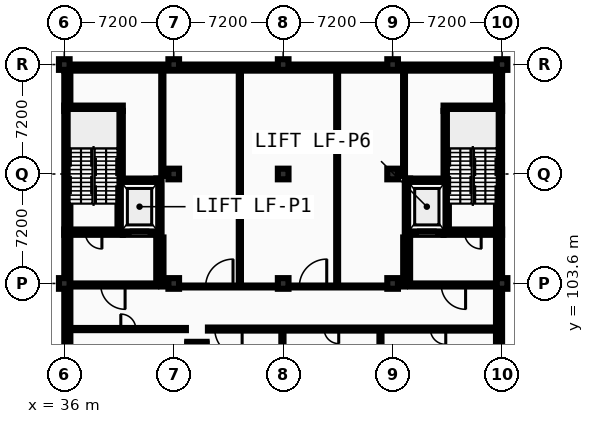
"""IFC4 building model, lengths in metres.
Left out: names, types, materials, properties, quantities, classifications, styles, units other than length and angle.
Written with IfcOpenShell. Run it as: python <this file> out.ifc"""

import sys

from ifc_helpers import new_model, si_unit, direction, frame, frame_2d, origin, origin_2d, place, context, subcontext, project, spatial, rectangle, extrude, element, fill, save


model = new_model("IFC4")
c1 = context("Model", 3, precision=1e-05, world=origin(), true_north=direction((0.0, 1.0)))
c2 = subcontext(c1, "Body", "Model", "MODEL_VIEW")
j1 = project(units=[si_unit("LENGTHUNIT", "METRE"), si_unit("PLANEANGLEUNIT", "RADIAN")], contexts=[c1])
p1 = place(None, origin())
s1 = spatial("IfcSite", under=j1, at=p1, CompositionType="ELEMENT")
p2 = place(p1, origin())
s2 = spatial("IfcBuilding", under=s1, at=p2, CompositionType="ELEMENT")
p3 = place(p2, frame((0.0, 0.0, -4.8)))
s3 = spatial("IfcBuildingStorey", under=s2, at=p3, CompositionType="ELEMENT", Elevation=-4.8)
for number, where, z_axis, x_axis in (
    (1, (36.0, 103.6, 0.0), (0.0, 0.0, 1.0), (1.0, 0.0, 0.0)),
    (2, (36.0, 118.0, 0.0), (0.0, 0.0, 1.0), (1.0, 0.0, 0.0)),
    (3, (43.2, 103.6, 0.0), (0.0, 0.0, 1.0), (1.0, 0.0, 0.0)),
    (4, (43.2, 110.8, 0.0), (0.0, 0.0, 1.0), (1.0, 0.0, 0.0)),
    (5, (43.2, 118.0, 0.0), (0.0, 0.0, 1.0), (1.0, 0.0, 0.0)),
    (6, (50.4, 103.6, 0.0), (0.0, 0.0, 1.0), (1.0, 0.0, 0.0)),
    (7, (50.4, 110.8, 0.0), (0.0, 0.0, 1.0), (1.0, 0.0, 0.0)),
    (8, (50.4, 118.0, 0.0), (0.0, 0.0, 1.0), (1.0, 0.0, 0.0)),
    (9, (57.6, 103.6, 0.0), (0.0, 0.0, 1.0), (1.0, 0.0, 0.0)),
    (10, (57.6, 110.8, 0.0), (0.0, 0.0, 1.0), (1.0, 0.0, 0.0)),
    (11, (57.6, 118.0, 0.0), (0.0, 0.0, 1.0), (1.0, 0.0, 0.0)),
    (12, (64.8, 103.6, 0.0), (0.0, 0.0, 1.0), (1.0, 0.0, 0.0)),
    (13, (64.8, 118.0, 0.0), (0.0, 0.0, 1.0), (1.0, 0.0, 0.0)),
):
    element("IfcColumn", number, at=place(p3, frame(where, z_axis=z_axis, x_axis=x_axis)), inside=s3, PredefinedType="COLUMN", context=c2, shape_type="SweptSolid", body=[
        extrude(rectangle(XDim=0.7, YDim=0.7, at=origin_2d()), origin(), (0.0, 0.0, 1.0), 4.8),
    ])
p4 = place(p3, frame((64.6, 79.2, 0.0), z_axis=(0.0, 0.0, 1.0), x_axis=(0.0, 1.0, 0.0)))
e14 = element("IfcWall", 14, at=p4, inside=s3, PredefinedType="USERDEFINED", context=c2, shape_type="SweptSolid", body=[
    extrude(rectangle(XDim=38.4, YDim=0.4, at=frame_2d((19.2, 0.0))), origin(), (0.0, 0.0, 1.0), 4.545),
])
p5 = place(p3, frame((64.8, 117.8, 0.0), z_axis=(0.0, 0.0, 1.0), x_axis=(-1.0, 0.0, 0.0)))
e15 = element("IfcWall", 15, at=p5, inside=s3, PredefinedType="USERDEFINED", context=c2, shape_type="SweptSolid", body=[
    extrude(rectangle(XDim=28.8, YDim=0.4, at=frame_2d((14.4, 0.0))), origin(), (0.0, 0.0, 1.0), 4.545),
])
p6 = place(p3, frame((36.2, 117.6, 0.0), z_axis=(0.0, 0.0, 1.0), x_axis=(0.0, -1.0, 0.0)))
e16 = element("IfcWall", 16, at=p6, inside=s3, PredefinedType="USERDEFINED", context=c2, shape_type="SweptSolid", body=[
    extrude(rectangle(XDim=38.4, YDim=0.4, at=frame_2d((19.2, 0.0))), origin(), (0.0, 0.0, 1.0), 4.545),
])
p7 = place(p3, frame((36.0, 106.975, 0.0), z_axis=(0.0, 0.0, 1.0), x_axis=(1.0, 0.0, 0.0)))
e17 = element("IfcWall", 17, at=p7, inside=s3, PredefinedType="SHEAR", context=c2, shape_type="SweptSolid", body=[
    extrude(rectangle(XDim=3.85, YDim=0.35, at=frame_2d((1.925, 0.0))), origin(), (0.0, 0.0, 1.0), 4.545),
])
p8 = place(p7, frame((1.375, 0.0, 0.0)))
e18 = element("IfcOpeningElement", 18, at=p8, cuts=e17, PredefinedType="OPENING", context=c2, shape_type="SweptSolid", body=[
    extrude(rectangle(XDim=1.1, YDim=2.15, at=frame_2d((0.55, 1.075))), frame((0.0, 0.185, 0.0), z_axis=(0.0, -1.0, 0.0), x_axis=(1.0, 0.0, 0.0)), (0.0, 0.0, 1.0), 0.37),
])
p9 = place(p3, frame((36.0, 115.125, 0.0), z_axis=(0.0, 0.0, 1.0), x_axis=(1.0, 0.0, 0.0)))
e19 = element("IfcWall", 19, at=p9, inside=s3, PredefinedType="SHEAR", context=c2, shape_type="SweptSolid", body=[
    extrude(rectangle(XDim=3.85, YDim=0.35, at=frame_2d((1.925, 0.0))), origin(), (0.0, 0.0, 1.0), 4.545),
])
p10 = place(p3, frame((39.675, 107.15, 0.0), z_axis=(0.0, 0.0, 1.0), x_axis=(0.0, 1.0, 0.0)))
e20 = element("IfcWall", 20, at=p10, inside=s3, PredefinedType="SHEAR", context=c2, shape_type="SweptSolid", body=[
    extrude(rectangle(XDim=7.8, YDim=0.35, at=frame_2d((3.9, 0.0))), origin(), (0.0, 0.0, 1.0), 4.545),
])
p11 = place(p3, frame((39.85, 106.975, 0.0), z_axis=(0.0, 0.0, 1.0), x_axis=(1.0, 0.0, 0.0)))
e21 = element("IfcWall", 21, at=p11, inside=s3, PredefinedType="SHEAR", context=c2, shape_type="SweptSolid", body=[
    extrude(rectangle(XDim=2.2, YDim=0.35, at=frame_2d((1.1, 0.0))), origin(), (0.0, 0.0, 1.0), 4.545),
])
p12 = place(p11, frame((0.5, 0.0, 0.0)))
e22 = element("IfcOpeningElement", 22, at=p12, cuts=e21, PredefinedType="OPENING", context=c2, shape_type="SweptSolid", body=[
    extrude(rectangle(XDim=1.2, YDim=2.2, at=frame_2d((0.6, 1.1))), frame((0.0, 0.185, 0.0), z_axis=(0.0, -1.0, 0.0), x_axis=(1.0, 0.0, 0.0)), (0.0, 0.0, 1.0), 0.37),
])
p13 = place(p3, frame((39.85, 110.325, 0.0), z_axis=(0.0, 0.0, 1.0), x_axis=(1.0, 0.0, 0.0)))
e23 = element("IfcWall", 23, at=p13, inside=s3, PredefinedType="SHEAR", context=c2, shape_type="SweptSolid", body=[
    extrude(rectangle(XDim=2.2, YDim=0.35, at=frame_2d((1.1, 0.0))), origin(), (0.0, 0.0, 1.0), 4.545),
])
p14 = place(p3, frame((42.225, 106.8, 0.0), z_axis=(0.0, 0.0, 1.0), x_axis=(0.0, 1.0, 0.0)))
e24 = element("IfcWall", 24, at=p14, inside=s3, PredefinedType="SHEAR", context=c2, shape_type="SweptSolid", body=[
    extrude(rectangle(XDim=3.7, YDim=0.35, at=frame_2d((1.85, 0.0))), origin(), (0.0, 0.0, 1.0), 4.545),
])
p15 = place(p3, frame((36.35, 103.5, 0.0), z_axis=(0.0, 0.0, 1.0), x_axis=(1.0, 0.0, 0.0)))
e25 = element("IfcWall", 25, at=p15, inside=s3, PredefinedType="PARTITIONING", context=c2, shape_type="SweptSolid", body=[
    extrude(rectangle(XDim=5.7, YDim=0.2, at=frame_2d((2.85, 0.0))), origin(), (0.0, 0.0, 1.0), 4.095),
])
p16 = place(p15, frame((2.05, 0.0, 0.0)))
e26 = element("IfcOpeningElement", 26, at=p16, cuts=e25, PredefinedType="OPENING", context=c2, shape_type="SweptSolid", body=[
    extrude(rectangle(XDim=1.6, YDim=2.2, at=frame_2d((0.8, 1.1))), frame((0.0, 0.11, 0.0), z_axis=(0.0, -1.0, 0.0), x_axis=(1.0, 0.0, 0.0)), (0.0, 0.0, 1.0), 0.22),
])
p17 = place(p3, frame((42.15, 103.6, 0.0), z_axis=(0.0, 0.0, 1.0), x_axis=(0.0, 1.0, 0.0)))
e27 = element("IfcWall", 27, at=p17, inside=s3, PredefinedType="PARTITIONING", context=c2, shape_type="SweptSolid", body=[
    extrude(rectangle(XDim=3.2, YDim=0.2, at=frame_2d((1.6, 0.0))), origin(), (0.0, 0.0, 1.0), 4.545),
])
p18 = place(p3, frame((60.95, 106.975, 0.0), z_axis=(0.0, 0.0, 1.0), x_axis=(1.0, 0.0, 0.0)))
e28 = element("IfcWall", 28, at=p18, inside=s3, PredefinedType="SHEAR", context=c2, shape_type="SweptSolid", body=[
    extrude(rectangle(XDim=3.85, YDim=0.35, at=frame_2d((1.925, 0.0))), origin(), (0.0, 0.0, 1.0), 4.545),
])
p19 = place(p18, frame((1.375, 0.0, 0.0)))
e29 = element("IfcOpeningElement", 29, at=p19, cuts=e28, PredefinedType="OPENING", context=c2, shape_type="SweptSolid", body=[
    extrude(rectangle(XDim=1.1, YDim=2.15, at=frame_2d((0.55, 1.075))), frame((0.0, 0.185, 0.0), z_axis=(0.0, -1.0, 0.0), x_axis=(1.0, 0.0, 0.0)), (0.0, 0.0, 1.0), 0.37),
])
p20 = place(p3, frame((60.95, 115.125, 0.0), z_axis=(0.0, 0.0, 1.0), x_axis=(1.0, 0.0, 0.0)))
e30 = element("IfcWall", 30, at=p20, inside=s3, PredefinedType="SHEAR", context=c2, shape_type="SweptSolid", body=[
    extrude(rectangle(XDim=3.85, YDim=0.35, at=frame_2d((1.925, 0.0))), origin(), (0.0, 0.0, 1.0), 4.545),
])
p21 = place(p3, frame((61.125, 107.15, 0.0), z_axis=(0.0, 0.0, 1.0), x_axis=(0.0, 1.0, 0.0)))
e31 = element("IfcWall", 31, at=p21, inside=s3, PredefinedType="SHEAR", context=c2, shape_type="SweptSolid", body=[
    extrude(rectangle(XDim=7.8, YDim=0.35, at=frame_2d((3.9, 0.0))), origin(), (0.0, 0.0, 1.0), 4.545),
])
p22 = place(p3, frame((58.75, 106.975, 0.0), z_axis=(0.0, 0.0, 1.0), x_axis=(1.0, 0.0, 0.0)))
e32 = element("IfcWall", 32, at=p22, inside=s3, PredefinedType="SHEAR", context=c2, shape_type="SweptSolid", body=[
    extrude(rectangle(XDim=2.2, YDim=0.35, at=frame_2d((1.1, 0.0))), origin(), (0.0, 0.0, 1.0), 4.545),
])
p23 = place(p22, frame((0.5, 0.0, 0.0)))
e33 = element("IfcOpeningElement", 33, at=p23, cuts=e32, PredefinedType="OPENING", context=c2, shape_type="SweptSolid", body=[
    extrude(rectangle(XDim=1.2, YDim=2.2, at=frame_2d((0.6, 1.1))), frame((0.0, 0.185, 0.0), z_axis=(0.0, -1.0, 0.0), x_axis=(1.0, 0.0, 0.0)), (0.0, 0.0, 1.0), 0.37),
])
p24 = place(p3, frame((58.75, 110.325, 0.0), z_axis=(0.0, 0.0, 1.0), x_axis=(1.0, 0.0, 0.0)))
e34 = element("IfcWall", 34, at=p24, inside=s3, PredefinedType="SHEAR", context=c2, shape_type="SweptSolid", body=[
    extrude(rectangle(XDim=2.2, YDim=0.35, at=frame_2d((1.1, 0.0))), origin(), (0.0, 0.0, 1.0), 4.545),
])
p25 = place(p3, frame((58.575, 106.8, 0.0), z_axis=(0.0, 0.0, 1.0), x_axis=(0.0, 1.0, 0.0)))
e35 = element("IfcWall", 35, at=p25, inside=s3, PredefinedType="SHEAR", context=c2, shape_type="SweptSolid", body=[
    extrude(rectangle(XDim=3.7, YDim=0.35, at=frame_2d((1.85, 0.0))), origin(), (0.0, 0.0, 1.0), 4.545),
])
p26 = place(p3, frame((58.75, 103.5, 0.0), z_axis=(0.0, 0.0, 1.0), x_axis=(1.0, 0.0, 0.0)))
e36 = element("IfcWall", 36, at=p26, inside=s3, PredefinedType="PARTITIONING", context=c2, shape_type="SweptSolid", body=[
    extrude(rectangle(XDim=5.7, YDim=0.2, at=frame_2d((2.85, 0.0))), origin(), (0.0, 0.0, 1.0), 4.095),
])
p27 = place(p26, frame((2.05, 0.0, 0.0)))
e37 = element("IfcOpeningElement", 37, at=p27, cuts=e36, PredefinedType="OPENING", context=c2, shape_type="SweptSolid", body=[
    extrude(rectangle(XDim=1.6, YDim=2.2, at=frame_2d((0.8, 1.1))), frame((0.0, 0.11, 0.0), z_axis=(0.0, -1.0, 0.0), x_axis=(1.0, 0.0, 0.0)), (0.0, 0.0, 1.0), 0.22),
])
p28 = place(p3, frame((58.65, 103.6, 0.0), z_axis=(0.0, 0.0, 1.0), x_axis=(0.0, 1.0, 0.0)))
e38 = element("IfcWall", 38, at=p28, inside=s3, PredefinedType="PARTITIONING", context=c2, shape_type="SweptSolid", body=[
    extrude(rectangle(XDim=3.2, YDim=0.2, at=frame_2d((1.6, 0.0))), origin(), (0.0, 0.0, 1.0), 4.545),
])
p29 = place(p3, frame((44.09, 99.705, 0.0), z_axis=(0.0, 0.0, 1.0), x_axis=(1.0, 0.0, 0.0)))
e39 = element("IfcWall", 39, at=p29, inside=s3, PredefinedType="PARTITIONING", context=c2, shape_type="SweptSolid", body=[
    extrude(rectangle(XDim=1.27, YDim=0.11, at=frame_2d((0.635, 0.0))), origin(), (0.0, 0.0, 1.0), 4.54),
])
for number, where, z_axis, x_axis in (
    (40, (44.145, 98.6, 0.0), (0.0, 0.0, 1.0), (0.0, 1.0, 0.0)),
    (41, (45.305, 98.6, 0.0), (0.0, 0.0, 1.0), (0.0, 1.0, 0.0)),
):
    element("IfcWall", number, at=place(p3, frame(where, z_axis=z_axis, x_axis=x_axis)), inside=s3, PredefinedType="PARTITIONING", context=c2, shape_type="SweptSolid", body=[
        extrude(rectangle(XDim=1.05, YDim=0.11, at=frame_2d((0.525, 0.0))), origin(), (0.0, 0.0, 1.0), 4.54),
    ])
p30 = place(p3, frame((36.42, 100.6, 0.0), z_axis=(0.0, 0.0, 1.0), x_axis=(1.0, 0.0, 0.0)))
e42 = element("IfcWall", 42, at=p30, inside=s3, PredefinedType="PARTITIONING", context=c2, shape_type="SweptSolid", body=[
    extrude(rectangle(XDim=7.58, YDim=0.142, at=frame_2d((3.79, 0.0))), origin(), (0.0, 0.0, 1.0), 4.545),
])
p31 = place(p30, frame((3.298, 0.0, 0.0)))
e43 = element("IfcOpeningElement", 43, at=p31, cuts=e42, PredefinedType="OPENING", context=c2, shape_type="SweptSolid", body=[
    extrude(rectangle(XDim=0.984, YDim=2.068, at=frame_2d((0.492, 1.034))), frame((0.0, 0.081, 0.0), z_axis=(0.0, -1.0, 0.0), x_axis=(1.0, 0.0, 0.0)), (0.0, 0.0, 1.0), 0.162),
])
p32 = place(p3, frame((45.45, 100.6, 0.0), z_axis=(0.0, 0.0, 1.0), x_axis=(1.0, 0.0, 0.0)))
e44 = element("IfcWall", 44, at=p32, inside=s3, PredefinedType="PARTITIONING", context=c2, shape_type="SweptSolid", body=[
    extrude(rectangle(XDim=18.93, YDim=0.2, at=frame_2d((9.465, 0.0))), origin(), (0.0, 0.0, 1.0), 4.545),
])
p33 = place(p32, frame((0.45, 0.0, 0.0)))
e45 = element("IfcOpeningElement", 45, at=p33, cuts=e44, PredefinedType="OPENING", context=c2, shape_type="SweptSolid", body=[
    extrude(rectangle(XDim=1.8, YDim=2.3, at=frame_2d((0.9, 1.15))), frame((0.0, 0.11, 0.0), z_axis=(0.0, -1.0, 0.0), x_axis=(1.0, 0.0, 0.0)), (0.0, 0.0, 1.0), 0.22),
])
p34 = place(p32, frame((7.646, 0.0, 0.0)))
e46 = element("IfcOpeningElement", 46, at=p34, cuts=e44, PredefinedType="OPENING", context=c2, shape_type="SweptSolid", body=[
    extrude(rectangle(XDim=0.958, YDim=2.068, at=frame_2d((0.479, 1.034))), frame((0.0, 0.11, 0.0), z_axis=(0.0, -1.0, 0.0), x_axis=(1.0, 0.0, 0.0)), (0.0, 0.0, 1.0), 0.22),
])
p35 = place(p32, frame((14.635, 0.0, 0.0)))
e47 = element("IfcOpeningElement", 47, at=p35, cuts=e44, PredefinedType="OPENING", context=c2, shape_type="SweptSolid", body=[
    extrude(rectangle(XDim=1.01, YDim=2.068, at=frame_2d((0.505, 1.034))), frame((0.0, 0.11, 0.0), z_axis=(0.0, -1.0, 0.0), x_axis=(1.0, 0.0, 0.0)), (0.0, 0.0, 1.0), 0.22),
])
p36 = place(p3, frame((43.58, 103.4, 0.0), z_axis=(0.0, 0.0, 1.0), x_axis=(1.0, 0.0, 0.0)))
e48 = element("IfcWall", 48, at=p36, inside=s3, PredefinedType="PARTITIONING", context=c2, shape_type="SweptSolid", body=[
    extrude(rectangle(XDim=6.44, YDim=0.125, at=frame_2d((3.22, 0.0))), origin(), (0.0, 0.0, 1.0), 4.095),
])
p37 = place(p36, frame((1.72, 0.0, 0.0)))
e49 = element("IfcOpeningElement", 49, at=p37, cuts=e48, PredefinedType="OPENING", context=c2, shape_type="SweptSolid", body=[
    extrude(rectangle(XDim=1.8, YDim=2.3, at=frame_2d((0.9, 1.15))), frame((0.0, 0.073, 0.0), z_axis=(0.0, -1.0, 0.0), x_axis=(1.0, 0.0, 0.0)), (0.0, 0.0, 1.0), 0.145),
])
p38 = place(p3, frame((50.78, 103.4, 0.0), z_axis=(0.0, 0.0, 1.0), x_axis=(1.0, 0.0, 0.0)))
e50 = element("IfcWall", 50, at=p38, inside=s3, PredefinedType="PARTITIONING", context=c2, shape_type="SweptSolid", body=[
    extrude(rectangle(XDim=6.44, YDim=0.125, at=frame_2d((3.22, 0.0))), origin(), (0.0, 0.0, 1.0), 4.095),
])
p39 = place(p38, frame((3.62, 0.0, 0.0)))
e51 = element("IfcOpeningElement", 51, at=p39, cuts=e50, PredefinedType="OPENING", context=c2, shape_type="SweptSolid", body=[
    extrude(rectangle(XDim=1.0, YDim=2.1, at=frame_2d((0.5, 1.05))), frame((0.0, 0.073, 0.0), z_axis=(0.0, -1.0, 0.0), x_axis=(1.0, 0.0, 0.0)), (0.0, 0.0, 1.0), 0.145),
])
p40 = place(p38, frame((0.685, 0.0, 0.0)))
e52 = element("IfcOpeningElement", 52, at=p40, cuts=e50, PredefinedType="OPENING", context=c2, shape_type="SweptSolid", body=[
    extrude(rectangle(XDim=1.8, YDim=2.3, at=frame_2d((0.9, 1.15))), frame((0.0, 0.073, 0.0), z_axis=(0.0, -1.0, 0.0), x_axis=(1.0, 0.0, 0.0)), (0.0, 0.0, 1.0), 0.145),
])
p41 = place(p3, frame((42.45, 103.4, 0.0), z_axis=(0.0, 0.0, 1.0), x_axis=(0.0, 1.0, 0.0)))
e53 = element("IfcWall", 53, at=p41, inside=s3, PredefinedType="PARTITIONING", context=c2, shape_type="SweptSolid", body=[
    extrude(rectangle(XDim=3.225, YDim=0.15, at=frame_2d((1.613, 0.0))), origin(), (0.0, 0.0, 1.0), 4.545),
])
p42 = place(p3, frame((42.45, 110.675, 0.0), z_axis=(0.0, 0.0, 1.0), x_axis=(0.0, 1.0, 0.0)))
e54 = element("IfcWall", 54, at=p42, inside=s3, PredefinedType="PARTITIONING", context=c2, shape_type="SweptSolid", body=[
    extrude(rectangle(XDim=6.925, YDim=0.142, at=frame_2d((3.462, 0.0))), origin(), (0.0, 0.0, 1.0), 4.545),
])
p43 = place(p3, frame((47.55, 103.462, 0.0), z_axis=(0.0, 0.0, 1.0), x_axis=(0.0, 1.0, 0.0)))
e55 = element("IfcWall", 55, at=p43, inside=s3, PredefinedType="PARTITIONING", context=c2, shape_type="SweptSolid", body=[
    extrude(rectangle(XDim=14.138, YDim=0.142, at=frame_2d((7.069, 0.0))), origin(), (0.0, 0.0, 1.0), 4.545),
])
p44 = place(p3, frame((50.35, 96.78, 0.0), z_axis=(0.0, 0.0, 1.0), x_axis=(0.0, 1.0, 0.0)))
e56 = element("IfcWall", 56, at=p44, inside=s3, PredefinedType="PARTITIONING", context=c2, shape_type="SweptSolid", body=[
    extrude(rectangle(XDim=3.72, YDim=0.142, at=frame_2d((1.86, 0.0))), origin(), (0.0, 0.0, 1.0), 4.245),
])
p45 = place(p3, frame((53.95, 103.462, 0.0), z_axis=(0.0, 0.0, 1.0), x_axis=(0.0, 1.0, 0.0)))
e57 = element("IfcWall", 57, at=p45, inside=s3, PredefinedType="PARTITIONING", context=c2, shape_type="SweptSolid", body=[
    extrude(rectangle(XDim=14.138, YDim=0.125, at=frame_2d((7.069, 0.0))), origin(), (0.0, 0.0, 1.0), 4.545),
])
p46 = place(p3, frame((56.8, 82.3, 0.0), z_axis=(0.0, 0.0, 1.0), x_axis=(0.0, 1.0, 0.0)))
e58 = element("IfcWall", 58, at=p46, inside=s3, PredefinedType="PARTITIONING", context=c2, shape_type="SweptSolid", body=[
    extrude(rectangle(XDim=18.2, YDim=0.135, at=frame_2d((9.1, 0.0))), origin(), (0.0, 0.0, 1.0), 4.545),
])
p47 = place(p3, frame((58.35, 103.4, 0.0), z_axis=(0.0, 0.0, 1.0), x_axis=(0.0, 1.0, 0.0)))
e59 = element("IfcWall", 59, at=p47, inside=s3, PredefinedType="PARTITIONING", context=c2, shape_type="SweptSolid", body=[
    extrude(rectangle(XDim=3.225, YDim=0.11, at=frame_2d((1.613, 0.0))), origin(), (0.0, 0.0, 1.0), 4.545),
])
p48 = place(p3, frame((58.35, 110.675, 0.0), z_axis=(0.0, 0.0, 1.0), x_axis=(0.0, 1.0, 0.0)))
e60 = element("IfcWall", 60, at=p48, inside=s3, PredefinedType="PARTITIONING", context=c2, shape_type="SweptSolid", body=[
    extrude(rectangle(XDim=6.925, YDim=0.125, at=frame_2d((3.462, 0.0))), origin(), (0.0, 0.0, 1.0), 4.545),
])
p49 = place(p8, origin())
e61 = element("IfcDoor", 61, at=p49, inside=s3, OperationType="SINGLE_SWING_RIGHT", PredefinedType="DOOR", context=c2, shape_type="SweptSolid", body=[
    extrude(rectangle(XDim=1.1, YDim=2.15, at=frame_2d((0.55, 1.075))), frame((0.0, 0.025, 0.0), z_axis=(0.0, -1.0, 0.0), x_axis=(1.0, 0.0, 0.0)), (0.0, 0.0, 1.0), 0.05),
])
fill(e18, e61)
p50 = place(p12, origin())
e62 = element("IfcDoor", 62, at=p50, inside=s3, OperationType="SLIDING_TO_RIGHT", PredefinedType="DOOR", context=c2, shape_type="SweptSolid", body=[
    extrude(rectangle(XDim=1.2, YDim=2.2, at=frame_2d((0.6, 1.1))), frame((0.0, 0.025, 0.0), z_axis=(0.0, -1.0, 0.0), x_axis=(1.0, 0.0, 0.0)), (0.0, 0.0, 1.0), 0.05),
])
fill(e22, e62)
p51 = place(p16, origin())
e63 = element("IfcDoor", 63, at=p51, inside=s3, OperationType="DOUBLE_DOOR_SINGLE_SWING", PredefinedType="DOOR", context=c2, shape_type="SweptSolid", body=[
    extrude(rectangle(XDim=1.6, YDim=2.2, at=frame_2d((0.8, 1.1))), frame((0.0, 0.025, 0.0), z_axis=(0.0, -1.0, 0.0), x_axis=(1.0, 0.0, 0.0)), (0.0, 0.0, 1.0), 0.05),
])
fill(e26, e63)
p52 = place(p19, origin())
e64 = element("IfcDoor", 64, at=p52, inside=s3, OperationType="SINGLE_SWING_RIGHT", PredefinedType="DOOR", context=c2, shape_type="SweptSolid", body=[
    extrude(rectangle(XDim=1.1, YDim=2.15, at=frame_2d((0.55, 1.075))), frame((0.0, 0.025, 0.0), z_axis=(0.0, -1.0, 0.0), x_axis=(1.0, 0.0, 0.0)), (0.0, 0.0, 1.0), 0.05),
])
fill(e29, e64)
p53 = place(p23, origin())
e65 = element("IfcDoor", 65, at=p53, inside=s3, OperationType="SLIDING_TO_RIGHT", PredefinedType="DOOR", context=c2, shape_type="SweptSolid", body=[
    extrude(rectangle(XDim=1.2, YDim=2.2, at=frame_2d((0.6, 1.1))), frame((0.0, 0.025, 0.0), z_axis=(0.0, -1.0, 0.0), x_axis=(1.0, 0.0, 0.0)), (0.0, 0.0, 1.0), 0.05),
])
fill(e33, e65)
p54 = place(p27, origin())
e66 = element("IfcDoor", 66, at=p54, inside=s3, OperationType="DOUBLE_DOOR_SINGLE_SWING", PredefinedType="DOOR", context=c2, shape_type="SweptSolid", body=[
    extrude(rectangle(XDim=1.6, YDim=2.2, at=frame_2d((0.8, 1.1))), frame((0.0, 0.025, 0.0), z_axis=(0.0, -1.0, 0.0), x_axis=(1.0, 0.0, 0.0)), (0.0, 0.0, 1.0), 0.05),
])
fill(e37, e66)
p55 = place(p39, frame((1.0, 0.0, 0.0), z_axis=(0.0, 0.0, 1.0), x_axis=(-1.0, 0.0, 0.0)))
e67 = element("IfcDoor", 67, at=p55, inside=s3, OperationType="SLIDING_TO_LEFT", PredefinedType="DOOR", context=c2, shape_type="SweptSolid", body=[
    extrude(rectangle(XDim=1.0, YDim=2.1, at=frame_2d((0.5, 1.05))), frame((0.0, 0.025, 0.0), z_axis=(0.0, -1.0, 0.0), x_axis=(1.0, 0.0, 0.0)), (0.0, 0.0, 1.0), 0.05),
])
fill(e51, e67)
p56 = place(p37, frame((1.8, 0.0, 0.0), z_axis=(0.0, 0.0, 1.0), x_axis=(-1.0, 0.0, 0.0)))
e68 = element("IfcDoor", 68, at=p56, inside=s3, OperationType="DOUBLE_DOOR_SINGLE_SWING", PredefinedType="DOOR", context=c2, shape_type="SweptSolid", body=[
    extrude(rectangle(XDim=1.8, YDim=2.3, at=frame_2d((0.9, 1.15))), frame((0.0, 0.025, 0.0), z_axis=(0.0, -1.0, 0.0), x_axis=(1.0, 0.0, 0.0)), (0.0, 0.0, 1.0), 0.05),
])
fill(e49, e68)
p57 = place(p33, origin())
e69 = element("IfcDoor", 69, at=p57, inside=s3, OperationType="DOUBLE_DOOR_SINGLE_SWING", PredefinedType="DOOR", context=c2, shape_type="SweptSolid", body=[
    extrude(rectangle(XDim=1.8, YDim=2.3, at=frame_2d((0.9, 1.15))), frame((0.0, 0.025, 0.0), z_axis=(0.0, -1.0, 0.0), x_axis=(1.0, 0.0, 0.0)), (0.0, 0.0, 1.0), 0.05),
])
fill(e45, e69)
p58 = place(p40, frame((1.8, 0.0, 0.0), z_axis=(0.0, 0.0, 1.0), x_axis=(-1.0, 0.0, 0.0)))
e70 = element("IfcDoor", 70, at=p58, inside=s3, OperationType="DOUBLE_DOOR_SINGLE_SWING", PredefinedType="DOOR", context=c2, shape_type="SweptSolid", body=[
    extrude(rectangle(XDim=1.8, YDim=2.3, at=frame_2d((0.9, 1.15))), frame((0.0, 0.025, 0.0), z_axis=(0.0, -1.0, 0.0), x_axis=(1.0, 0.0, 0.0)), (0.0, 0.0, 1.0), 0.05),
])
fill(e52, e70)
p59 = place(p34, origin())
e71 = element("IfcDoor", 71, at=p59, inside=s3, OperationType="SINGLE_SWING_RIGHT", PredefinedType="DOOR", context=c2, shape_type="SweptSolid", body=[
    extrude(rectangle(XDim=0.958, YDim=2.068, at=frame_2d((0.479, 1.034))), frame((0.0, 0.025, 0.0), z_axis=(0.0, -1.0, 0.0), x_axis=(1.0, 0.0, 0.0)), (0.0, 0.0, 1.0), 0.05),
])
fill(e46, e71)
p60 = place(p31, origin())
e72 = element("IfcDoor", 72, at=p60, inside=s3, OperationType="SINGLE_SWING_LEFT", PredefinedType="DOOR", context=c2, shape_type="SweptSolid", body=[
    extrude(rectangle(XDim=0.984, YDim=2.068, at=frame_2d((0.492, 1.034))), frame((0.0, 0.025, 0.0), z_axis=(0.0, -1.0, 0.0), x_axis=(1.0, 0.0, 0.0)), (0.0, 0.0, 1.0), 0.05),
])
fill(e43, e72)
p61 = place(p35, origin())
e73 = element("IfcDoor", 73, at=p61, inside=s3, OperationType="SINGLE_SWING_RIGHT", PredefinedType="DOOR", context=c2, shape_type="SweptSolid", body=[
    extrude(rectangle(XDim=1.01, YDim=2.068, at=frame_2d((0.505, 1.034))), frame((0.0, 0.025, 0.0), z_axis=(0.0, -1.0, 0.0), x_axis=(1.0, 0.0, 0.0)), (0.0, 0.0, 1.0), 0.05),
])
fill(e47, e73)
save(model, sys.argv[1])
